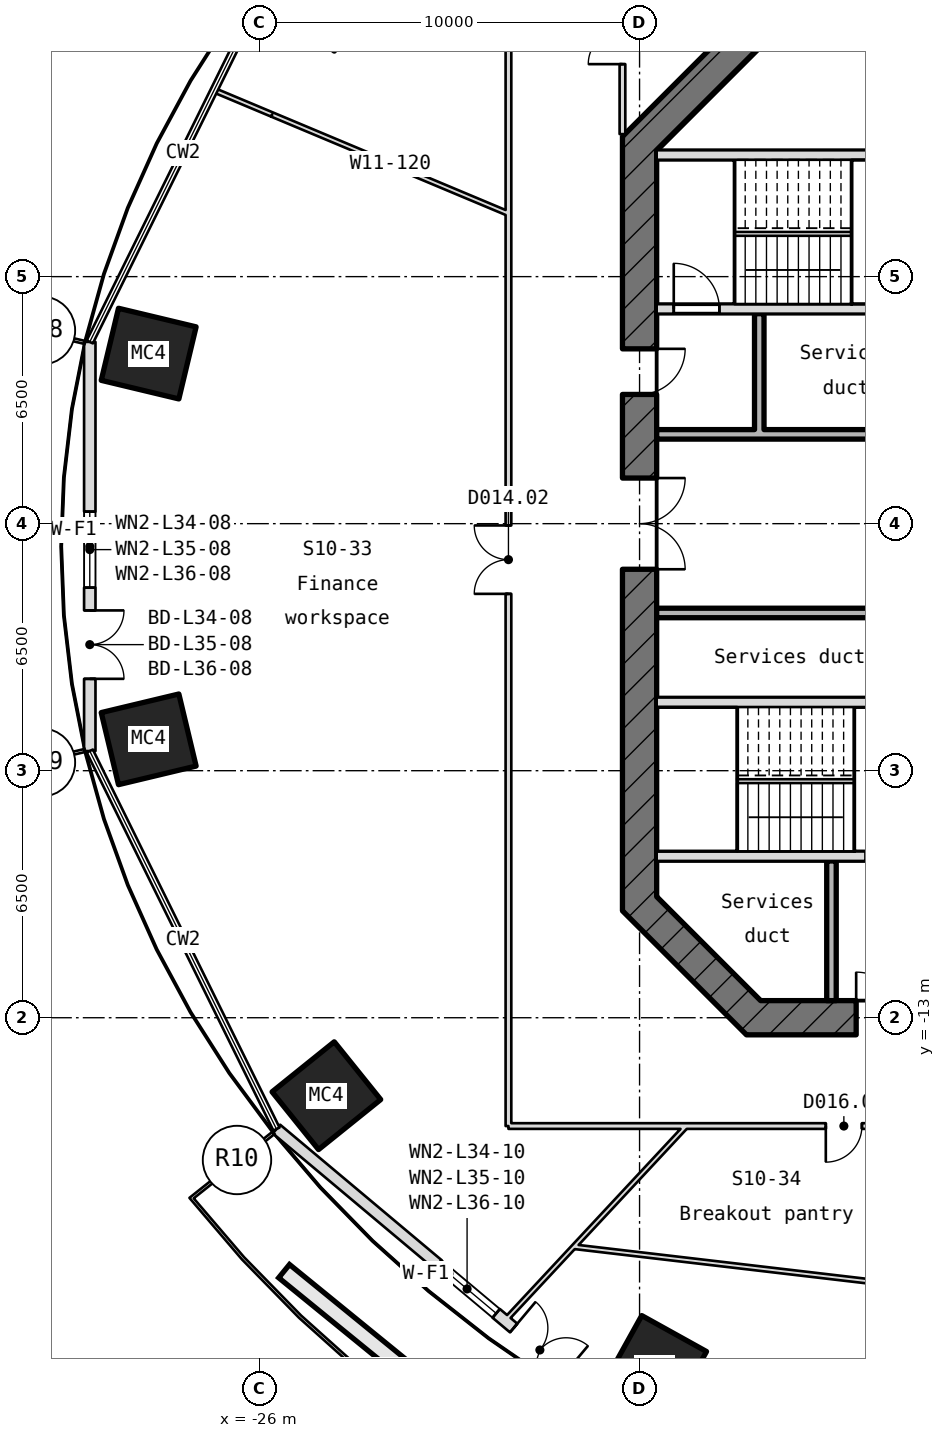
"""IFC4 building model, lengths in metres.
Left out: names, types, materials, properties, quantities, classifications, styles, units other than length and angle.
Written with IfcOpenShell. Run it as: python <this file> out.ifc"""

import sys

from ifc_helpers import new_model, si_unit, direction, frame, frame_2d, origin, origin_2d, place, context, subcontext, project, spatial, rectangle, hollow_rectangle, extrude, element, fill, save


model = new_model("IFC4")
c1 = context("Model", 3, precision=1e-05, world=origin(), true_north=direction((0.0, 1.0)))
c2 = subcontext(c1, "Body", "Model", "MODEL_VIEW")
j1 = project(units=[si_unit("LENGTHUNIT", "METRE"), si_unit("PLANEANGLEUNIT", "RADIAN")], contexts=[c1])
p1 = place(None, origin())
s1 = spatial("IfcSite", under=j1, at=p1, CompositionType="ELEMENT")
p2 = place(p1, origin())
s2 = spatial("IfcBuilding", under=s1, at=p2, CompositionType="ELEMENT")
p3 = place(p2, frame((0.0, 0.0, 161.05)))
s3 = spatial("IfcBuildingStorey", under=s2, at=p3, CompositionType="ELEMENT", Elevation=161.05)
for number, where, z_axis, x_axis in (
    (1, (-28.917, 4.475, -0.18), (0.0, 0.0, 1.0), (0.233, 0.972, 0.0)),
    (2, (-28.917, -5.675, -0.18), (0.0, 0.0, 1.0), (-0.233, 0.972, 0.0)),
    (3, (-24.241, -15.052, -0.18), (0.0, 0.0, 1.0), (-0.627, 0.779, 0.0)),
    (4, (-15.6, -22.228, -0.18), (0.0, 0.0, 1.0), (-0.874, 0.485, 0.0)),
):
    element("IfcColumn", number, at=place(p3, frame(where, z_axis=z_axis, x_axis=x_axis)), inside=s3, PredefinedType="COLUMN", context=c2, shape_type="SweptSolid", body=[
        extrude(hollow_rectangle(XDim=1.95, YDim=2.1, WallThickness=0.075, at=origin_2d()), origin(), (0.0, 0.0, 1.0), 4.15),
    ])
p4 = place(p3, frame((-30.467, 4.783, 0.0), z_axis=(0.0, 0.0, 1.0), x_axis=(0.0, -1.0, 0.0)))
e5 = element("IfcWall", 5, at=p4, inside=s3, PredefinedType="SOLIDWALL", context=c2, shape_type="SweptSolid", body=[
    extrude(rectangle(XDim=10.766, YDim=0.3, at=frame_2d((5.383, 0.0))), origin(), (0.0, 0.0, 1.0), 3.97),
])
p5 = place(p4, frame((7.066, 0.0, 0.0)))
e6 = element("IfcOpeningElement", 6, at=p5, cuts=e5, PredefinedType="OPENING", context=c2, shape_type="SweptSolid", body=[
    extrude(rectangle(XDim=1.8, YDim=2.4, at=frame_2d((0.9, 1.2))), frame((0.0, 0.16, 0.0), z_axis=(0.0, -1.0, 0.0), x_axis=(1.0, 0.0, 0.0)), (0.0, 0.0, 1.0), 0.32),
])
p6 = place(p4, frame((4.466, 0.0, 0.9)))
e7 = element("IfcOpeningElement", 7, at=p6, cuts=e5, PredefinedType="OPENING", context=c2, shape_type="SweptSolid", body=[
    extrude(rectangle(XDim=2.0, YDim=1.5, at=frame_2d((1.0, 0.75))), frame((0.0, 0.16, 0.0), z_axis=(0.0, -1.0, 0.0), x_axis=(1.0, 0.0, 0.0)), (0.0, 0.0, 1.0), 0.32),
])
p7 = place(p3, frame((-25.554, -15.929, 0.0), z_axis=(0.0, 0.0, 1.0), x_axis=(0.766186960617, -0.642617725697, 0.0)))
e8 = element("IfcWall", 8, at=p7, inside=s3, PredefinedType="SOLIDWALL", context=c2, shape_type="SweptSolid", body=[
    extrude(rectangle(XDim=11.846, YDim=0.3, at=frame_2d((5.923, 0.0))), origin(), (0.0, 0.0, 1.0), 3.97),
])
p8 = place(p7, frame((8.146, 0.0, 0.0)))
e9 = element("IfcOpeningElement", 9, at=p8, cuts=e8, PredefinedType="OPENING", context=c2, shape_type="SweptSolid", body=[
    extrude(rectangle(XDim=1.8, YDim=2.4, at=frame_2d((0.9, 1.2))), frame((0.0, 0.16, 0.0), z_axis=(0.0, -1.0, 0.0), x_axis=(1.0, 0.0, 0.0)), (0.0, 0.0, 1.0), 0.32),
])
p9 = place(p7, frame((5.546, 0.0, 0.9)))
e10 = element("IfcOpeningElement", 10, at=p9, cuts=e8, PredefinedType="OPENING", context=c2, shape_type="SweptSolid", body=[
    extrude(rectangle(XDim=2.0, YDim=1.5, at=frame_2d((1.0, 0.75))), frame((0.0, 0.16, 0.0), z_axis=(0.0, -1.0, 0.0), x_axis=(1.0, 0.0, 0.0)), (0.0, 0.0, 1.0), 0.32),
])
p10 = place(p3, frame((-12.868, 13.132, -0.18), z_axis=(0.0, 0.0, 1.0), x_axis=(-0.707106781187, -0.707106781187, 0.0)))
e11 = element("IfcWall", 11, at=p10, inside=s3, PredefinedType="SHEAR", context=c2, shape_type="SweptSolid", body=[
    extrude(rectangle(XDim=4.615, YDim=0.9, at=frame_2d((2.308, 0.0))), origin(), (0.0, 0.0, 1.0), 4.15),
])
p11 = place(p3, frame((-16.0, 10.186, -0.18), z_axis=(0.0, 0.0, 1.0), x_axis=(0.0, -1.0, 0.0)))
e12 = element("IfcWall", 12, at=p11, inside=s3, PredefinedType="SHEAR", context=c2, shape_type="SweptSolid", body=[
    extrude(rectangle(XDim=20.373, YDim=0.9, at=frame_2d((10.186, 0.0))), origin(), (0.0, 0.0, 1.0), 4.15),
])
p12 = place(p11, frame((8.986, 0.0, 0.18)))
e13 = element("IfcOpeningElement", 13, at=p12, cuts=e12, PredefinedType="OPENING", context=c2, shape_type="SweptSolid", body=[
    extrude(rectangle(XDim=2.4, YDim=2.1, at=frame_2d((1.2, 1.05))), frame((0.0, 0.46, 0.0), z_axis=(0.0, -1.0, 0.0), x_axis=(1.0, 0.0, 0.0)), (0.0, 0.0, 1.0), 0.92),
])
p13 = place(p11, frame((5.586, 0.0, 0.18)))
e14 = element("IfcOpeningElement", 14, at=p13, cuts=e12, PredefinedType="OPENING", context=c2, shape_type="SweptSolid", body=[
    extrude(rectangle(XDim=1.2, YDim=2.1, at=frame_2d((0.6, 1.05))), frame((0.0, 0.46, 0.0), z_axis=(0.0, -1.0, 0.0), x_axis=(1.0, 0.0, 0.0)), (0.0, 0.0, 1.0), 0.92),
])
p14 = place(p3, frame((-16.132, -9.868, -0.18), z_axis=(0.0, 0.0, 1.0), x_axis=(0.707106781187, -0.707106781187, 0.0)))
e15 = element("IfcWall", 15, at=p14, inside=s3, PredefinedType="SHEAR", context=c2, shape_type="SweptSolid", body=[
    extrude(rectangle(XDim=4.615, YDim=0.9, at=frame_2d((2.308, 0.0))), origin(), (0.0, 0.0, 1.0), 4.15),
])
p15 = place(p3, frame((-13.186, -13.0, -0.18), z_axis=(0.0, 0.0, 1.0), x_axis=(1.0, 0.0, 0.0)))
e16 = element("IfcWall", 16, at=p15, inside=s3, PredefinedType="SHEAR", context=c2, shape_type="SweptSolid", body=[
    extrude(rectangle(XDim=26.373, YDim=0.9, at=frame_2d((13.186, 0.0))), origin(), (0.0, 0.0, 1.0), 4.15),
])
p16 = place(p15, frame((2.886, 0.0, 0.18)))
e17 = element("IfcOpeningElement", 17, at=p16, cuts=e16, PredefinedType="OPENING", context=c2, shape_type="SweptSolid", body=[
    extrude(rectangle(XDim=1.2, YDim=2.1, at=frame_2d((0.6, 1.05))), frame((0.0, 0.46, 0.0), z_axis=(0.0, -1.0, 0.0), x_axis=(1.0, 0.0, 0.0)), (0.0, 0.0, 1.0), 0.92),
])
p17 = place(p15, frame((6.886, 0.0, 0.18)))
e18 = element("IfcOpeningElement", 18, at=p17, cuts=e16, PredefinedType="OPENING", context=c2, shape_type="SweptSolid", body=[
    extrude(rectangle(XDim=1.4, YDim=2.1, at=frame_2d((0.7, 1.05))), frame((0.0, 0.46, 0.0), z_axis=(0.0, -1.0, 0.0), x_axis=(1.0, 0.0, 0.0)), (0.0, 0.0, 1.0), 0.92),
])
p18 = place(p15, frame((15.486, 0.0, 0.18)))
e19 = element("IfcOpeningElement", 19, at=p18, cuts=e16, PredefinedType="OPENING", context=c2, shape_type="SweptSolid", body=[
    extrude(rectangle(XDim=1.4, YDim=2.1, at=frame_2d((0.7, 1.05))), frame((0.0, 0.46, 0.0), z_axis=(0.0, -1.0, 0.0), x_axis=(1.0, 0.0, 0.0)), (0.0, 0.0, 1.0), 0.92),
])
p19 = place(p3, frame((-15.55, -8.75, -0.18), z_axis=(0.0, 0.0, 1.0), x_axis=(1.0, 0.0, 0.0)))
e20 = element("IfcWall", 20, at=p19, inside=s3, PredefinedType="SHEAR", context=c2, shape_type="SweptSolid", body=[
    extrude(rectangle(XDim=7.0, YDim=0.25, at=frame_2d((3.5, 0.0))), origin(), (0.0, 0.0, 1.0), 4.15),
])
p20 = place(p19, frame((5.5, 0.0, 0.18)))
e21 = element("IfcOpeningElement", 21, at=p20, cuts=e20, PredefinedType="OPENING", context=c2, shape_type="SweptSolid", body=[
    extrude(rectangle(XDim=1.2, YDim=2.1, at=frame_2d((0.6, 1.05))), frame((0.0, 0.135, 0.0), z_axis=(0.0, -1.0, 0.0), x_axis=(1.0, 0.0, 0.0)), (0.0, 0.0, 1.0), 0.27),
])
p21 = place(p3, frame((-15.55, -4.7, -0.18), z_axis=(0.0, 0.0, 1.0), x_axis=(1.0, 0.0, 0.0)))
e22 = element("IfcWall", 22, at=p21, inside=s3, PredefinedType="SHEAR", context=c2, shape_type="SweptSolid", body=[
    extrude(rectangle(XDim=7.0, YDim=0.25, at=frame_2d((3.5, 0.0))), origin(), (0.0, 0.0, 1.0), 4.15),
])
for number, where, z_axis, x_axis in (
    (23, (-15.55, -2.35, 0.0), (0.0, 0.0, 1.0), (1.0, 0.0, 0.0)),
    (24, (-15.55, 2.35, 0.0), (0.0, 0.0, 1.0), (1.0, 0.0, 0.0)),
):
    element("IfcWall", number, at=place(p3, frame(where, z_axis=z_axis, x_axis=x_axis)), inside=s3, PredefinedType="STANDARD", context=c2, shape_type="SweptSolid", body=[
        extrude(rectangle(XDim=7.15, YDim=0.25, at=frame_2d((3.575, 0.0))), origin(), (0.0, 0.0, 1.0), 3.97),
    ])
p22 = place(p3, frame((-15.55, 5.65, -0.18), z_axis=(0.0, 0.0, 1.0), x_axis=(1.0, 0.0, 0.0)))
e25 = element("IfcWall", 25, at=p22, inside=s3, PredefinedType="SHEAR", context=c2, shape_type="SweptSolid", body=[
    extrude(rectangle(XDim=7.0, YDim=0.25, at=frame_2d((3.5, 0.0))), origin(), (0.0, 0.0, 1.0), 4.15),
])
p23 = place(p22, frame((0.45, 0.0, 0.18)))
e26 = element("IfcOpeningElement", 26, at=p23, cuts=e25, PredefinedType="OPENING", context=c2, shape_type="SweptSolid", body=[
    extrude(rectangle(XDim=1.2, YDim=2.1, at=frame_2d((0.6, 1.05))), frame((0.0, 0.135, 0.0), z_axis=(0.0, -1.0, 0.0), x_axis=(1.0, 0.0, 0.0)), (0.0, 0.0, 1.0), 0.27),
])
p24 = place(p3, frame((-15.55, 9.7, -0.18), z_axis=(0.0, 0.0, 1.0), x_axis=(1.0, 0.0, 0.0)))
e27 = element("IfcWall", 27, at=p24, inside=s3, PredefinedType="SHEAR", context=c2, shape_type="SweptSolid", body=[
    extrude(rectangle(XDim=7.0, YDim=0.25, at=frame_2d((3.5, 0.0))), origin(), (0.0, 0.0, 1.0), 4.15),
])
p25 = place(p3, frame((-12.85, 2.475, 0.0), z_axis=(0.0, 0.0, 1.0), x_axis=(0.0, 1.0, 0.0)))
e28 = element("IfcWall", 28, at=p25, inside=s3, PredefinedType="STANDARD", context=c2, shape_type="SweptSolid", body=[
    extrude(rectangle(XDim=3.05, YDim=0.25, at=frame_2d((1.525, 0.0))), origin(), (0.0, 0.0, 1.0), 3.97),
])
p26 = place(p3, frame((-10.95, -12.55, 0.0), z_axis=(0.0, 0.0, 1.0), x_axis=(0.0, 1.0, 0.0)))
e29 = element("IfcWall", 29, at=p26, inside=s3, PredefinedType="STANDARD", context=c2, shape_type="SweptSolid", body=[
    extrude(rectangle(XDim=3.675, YDim=0.25, at=frame_2d((1.837, 0.0))), origin(), (0.0, 0.0, 1.0), 3.97),
])
p27 = place(p3, frame((-19.45, -15.85, 0.0), z_axis=(0.0, 0.0, 1.0), x_axis=(0.0, 1.0, 0.0)))
e30 = element("IfcWall", 30, at=p27, inside=s3, PredefinedType="PARTITIONING", context=c2, shape_type="SweptSolid", body=[
    extrude(rectangle(XDim=31.582, YDim=0.15, at=frame_2d((15.791, 0.0))), origin(), (0.0, 0.0, 1.0), 3.97),
])
p28 = place(p27, frame((14.003, 0.0, 0.0)))
e31 = element("IfcOpeningElement", 31, at=p28, cuts=e30, PredefinedType="OPENING", context=c2, shape_type="SweptSolid", body=[
    extrude(rectangle(XDim=1.8, YDim=2.1, at=frame_2d((0.9, 1.05))), frame((0.0, 0.085, 0.0), z_axis=(0.0, -1.0, 0.0), x_axis=(1.0, 0.0, 0.0)), (0.0, 0.0, 1.0), 0.17),
])
p29 = place(p3, frame((-19.45, 8.156, 0.0), z_axis=(0.0, 0.0, 1.0), x_axis=(-0.922204794335, 0.386701845489, 0.0)))
e32 = element("IfcWall", 32, at=p29, inside=s3, PredefinedType="PARTITIONING", context=c2, shape_type="SweptSolid", body=[
    extrude(rectangle(XDim=6.743, YDim=0.12, at=frame_2d((3.372, 0.0))), origin(), (0.0, 0.0, 1.0), 3.434),
])
p30 = place(p3, frame((-25.669, 10.764, 0.0), z_axis=(0.0, 0.0, 1.0), x_axis=(-0.922189295002, 0.386738806151, 0.0)))
e33 = element("IfcWall", 33, at=p30, inside=s3, PredefinedType="PARTITIONING", context=c2, shape_type="SweptSolid", body=[
    extrude(rectangle(XDim=1.656, YDim=0.12, at=frame_2d((0.828, 0.0))), origin(), (0.0, 0.0, 1.0), 3.97),
])
p31 = place(p3, frame((-17.729, -19.025, 0.0), z_axis=(0.0, 0.0, 1.0), x_axis=(0.99318471995, -0.116550899001, 0.0)))
e34 = element("IfcWall", 34, at=p31, inside=s3, PredefinedType="PARTITIONING", context=c2, shape_type="SweptSolid", body=[
    extrude(rectangle(XDim=19.125, YDim=0.12, at=frame_2d((9.562, 0.0))), origin(), (0.0, 0.0, 1.0), 3.97),
])
p32 = place(p3, frame((-16.45, 10.25, 0.0), z_axis=(0.0, 0.0, 1.0), x_axis=(0.0, 1.0, 0.0)))
e35 = element("IfcWall", 35, at=p32, inside=s3, PredefinedType="PARTITIONING", context=c2, shape_type="SweptSolid", body=[
    extrude(rectangle(XDim=6.654, YDim=0.15, at=frame_2d((3.327, 0.0))), origin(), (0.0, 0.0, 1.0), 3.97),
])
p33 = place(p32, frame((1.841, 0.0, 0.0)))
e36 = element("IfcOpeningElement", 36, at=p33, cuts=e35, PredefinedType="OPENING", context=c2, shape_type="SweptSolid", body=[
    extrude(rectangle(XDim=1.8, YDim=2.1, at=frame_2d((0.9, 1.05))), frame((0.0, 0.085, 0.0), z_axis=(0.0, -1.0, 0.0), x_axis=(1.0, 0.0, 0.0)), (0.0, 0.0, 1.0), 0.17),
])
p34 = place(p3, frame((-14.77, -15.85, 0.0), z_axis=(0.0, 0.0, 1.0), x_axis=(-0.681748932873, -0.731586216742, 0.0)))
e37 = element("IfcWall", 37, at=p34, inside=s3, PredefinedType="PARTITIONING", context=c2, shape_type="SweptSolid", body=[
    extrude(rectangle(XDim=7.0, YDim=0.12, at=frame_2d((3.5, 0.0))), origin(), (0.0, 0.0, 1.0), 3.97),
])
p35 = place(p3, frame((19.45, -15.85, 0.0), z_axis=(0.0, 0.0, 1.0), x_axis=(-1.0, 0.0, 0.0)))
e38 = element("IfcWall", 38, at=p35, inside=s3, PredefinedType="PARTITIONING", context=c2, shape_type="SweptSolid", body=[
    extrude(rectangle(XDim=38.9, YDim=0.15, at=frame_2d((19.45, 0.0))), origin(), (0.0, 0.0, 1.0), 3.97),
])
p36 = place(p35, frame((29.599, 0.0, 0.0)))
e39 = element("IfcOpeningElement", 39, at=p36, cuts=e38, PredefinedType="OPENING", context=c2, shape_type="SweptSolid", body=[
    extrude(rectangle(XDim=0.95, YDim=2.1, at=frame_2d((0.475, 1.05))), frame((0.0, 0.085, 0.0), z_axis=(0.0, -1.0, 0.0), x_axis=(1.0, 0.0, 0.0)), (0.0, 0.0, 1.0), 0.17),
])
p37 = place(p35, frame((21.742, 0.0, 0.0)))
e40 = element("IfcOpeningElement", 40, at=p37, cuts=e38, PredefinedType="OPENING", context=c2, shape_type="SweptSolid", body=[
    extrude(rectangle(XDim=0.95, YDim=2.1, at=frame_2d((0.475, 1.05))), frame((0.0, 0.085, 0.0), z_axis=(0.0, -1.0, 0.0), x_axis=(1.0, 0.0, 0.0)), (0.0, 0.0, 1.0), 0.17),
])
p38 = place(p35, frame((14.406, 0.0, 0.0)))
e41 = element("IfcOpeningElement", 41, at=p38, cuts=e38, PredefinedType="OPENING", context=c2, shape_type="SweptSolid", body=[
    extrude(rectangle(XDim=1.8, YDim=2.1, at=frame_2d((0.9, 1.05))), frame((0.0, 0.085, 0.0), z_axis=(0.0, -1.0, 0.0), x_axis=(1.0, 0.0, 0.0)), (0.0, 0.0, 1.0), 0.17),
])
p39 = place(p5, origin())
e42 = element("IfcDoor", 42, at=p39, inside=s3, OperationType="SINGLE_SWING_LEFT", PredefinedType="DOOR", context=c2, shape_type="SweptSolid", body=[
    extrude(rectangle(XDim=1.8, YDim=2.4, at=frame_2d((0.9, 1.2))), frame((0.0, 0.025, 0.0), z_axis=(0.0, -1.0, 0.0), x_axis=(1.0, 0.0, 0.0)), (0.0, 0.0, 1.0), 0.05),
])
fill(e6, e42)
p40 = place(p6, origin())
e43 = element("IfcWindow", 43, at=p40, inside=s3, PartitioningType="SINGLE_PANEL", PredefinedType="WINDOW", context=c2, shape_type="SweptSolid", body=[
    extrude(rectangle(XDim=2.0, YDim=1.5, at=frame_2d((1.0, 0.75))), frame((0.0, 0.03, 0.0), z_axis=(0.0, -1.0, 0.0), x_axis=(1.0, 0.0, 0.0)), (0.0, 0.0, 1.0), 0.06),
])
fill(e7, e43)
p41 = place(p8, origin())
e44 = element("IfcDoor", 44, at=p41, inside=s3, OperationType="SINGLE_SWING_LEFT", PredefinedType="DOOR", context=c2, shape_type="SweptSolid", body=[
    extrude(rectangle(XDim=1.8, YDim=2.4, at=frame_2d((0.9, 1.2))), frame((0.0, 0.025, 0.0), z_axis=(0.0, -1.0, 0.0), x_axis=(1.0, 0.0, 0.0)), (0.0, 0.0, 1.0), 0.05),
])
fill(e9, e44)
p42 = place(p9, origin())
e45 = element("IfcWindow", 45, at=p42, inside=s3, PartitioningType="SINGLE_PANEL", PredefinedType="WINDOW", context=c2, shape_type="SweptSolid", body=[
    extrude(rectangle(XDim=2.0, YDim=1.5, at=frame_2d((1.0, 0.75))), frame((0.0, 0.03, 0.0), z_axis=(0.0, -1.0, 0.0), x_axis=(1.0, 0.0, 0.0)), (0.0, 0.0, 1.0), 0.06),
])
fill(e10, e45)
p43 = place(p23, origin())
e46 = element("IfcDoor", 46, at=p43, inside=s3, OperationType="SINGLE_SWING_RIGHT", PredefinedType="DOOR", context=c2, shape_type="SweptSolid", body=[
    extrude(rectangle(XDim=1.2, YDim=2.1, at=frame_2d((0.6, 1.05))), frame((0.0, 0.025, 0.0), z_axis=(0.0, -1.0, 0.0), x_axis=(1.0, 0.0, 0.0)), (0.0, 0.0, 1.0), 0.05),
])
fill(e26, e46)
p44 = place(p12, origin())
e47 = element("IfcDoor", 47, at=p44, inside=s3, OperationType="DOUBLE_DOOR_SINGLE_SWING", PredefinedType="DOOR", context=c2, shape_type="SweptSolid", body=[
    extrude(rectangle(XDim=2.4, YDim=2.1, at=frame_2d((1.2, 1.05))), frame((0.0, 0.025, 0.0), z_axis=(0.0, -1.0, 0.0), x_axis=(1.0, 0.0, 0.0)), (0.0, 0.0, 1.0), 0.05),
])
fill(e13, e47)
p45 = place(p13, origin())
e48 = element("IfcDoor", 48, at=p45, inside=s3, OperationType="SINGLE_SWING_RIGHT", PredefinedType="DOOR", context=c2, shape_type="SweptSolid", body=[
    extrude(rectangle(XDim=1.2, YDim=2.1, at=frame_2d((0.6, 1.05))), frame((0.0, 0.025, 0.0), z_axis=(0.0, -1.0, 0.0), x_axis=(1.0, 0.0, 0.0)), (0.0, 0.0, 1.0), 0.05),
])
fill(e14, e48)
p46 = place(p16, origin())
e49 = element("IfcDoor", 49, at=p46, inside=s3, OperationType="SINGLE_SWING_RIGHT", PredefinedType="DOOR", context=c2, shape_type="SweptSolid", body=[
    extrude(rectangle(XDim=1.2, YDim=2.1, at=frame_2d((0.6, 1.05))), frame((0.0, 0.025, 0.0), z_axis=(0.0, -1.0, 0.0), x_axis=(1.0, 0.0, 0.0)), (0.0, 0.0, 1.0), 0.05),
])
fill(e17, e49)
p47 = place(p28, origin())
e50 = element("IfcDoor", 50, at=p47, inside=s3, OperationType="DOUBLE_DOOR_SINGLE_SWING", PredefinedType="DOOR", context=c2, shape_type="SweptSolid", body=[
    extrude(rectangle(XDim=1.8, YDim=2.1, at=frame_2d((0.9, 1.05))), frame((0.0, 0.025, 0.0), z_axis=(0.0, -1.0, 0.0), x_axis=(1.0, 0.0, 0.0)), (0.0, 0.0, 1.0), 0.05),
])
fill(e31, e50)
p48 = place(p36, origin())
e51 = element("IfcDoor", 51, at=p48, inside=s3, OperationType="SINGLE_SWING_RIGHT", PredefinedType="DOOR", context=c2, shape_type="SweptSolid", body=[
    extrude(rectangle(XDim=0.95, YDim=2.1, at=frame_2d((0.475, 1.05))), frame((0.0, 0.025, 0.0), z_axis=(0.0, -1.0, 0.0), x_axis=(1.0, 0.0, 0.0)), (0.0, 0.0, 1.0), 0.05),
])
fill(e39, e51)
p49 = place(p33, origin())
e52 = element("IfcDoor", 52, at=p49, inside=s3, OperationType="DOUBLE_DOOR_SINGLE_SWING", PredefinedType="DOOR", context=c2, shape_type="SweptSolid", body=[
    extrude(rectangle(XDim=1.8, YDim=2.1, at=frame_2d((0.9, 1.05))), frame((0.0, 0.025, 0.0), z_axis=(0.0, -1.0, 0.0), x_axis=(1.0, 0.0, 0.0)), (0.0, 0.0, 1.0), 0.05),
])
fill(e36, e52)
save(model, sys.argv[1])
